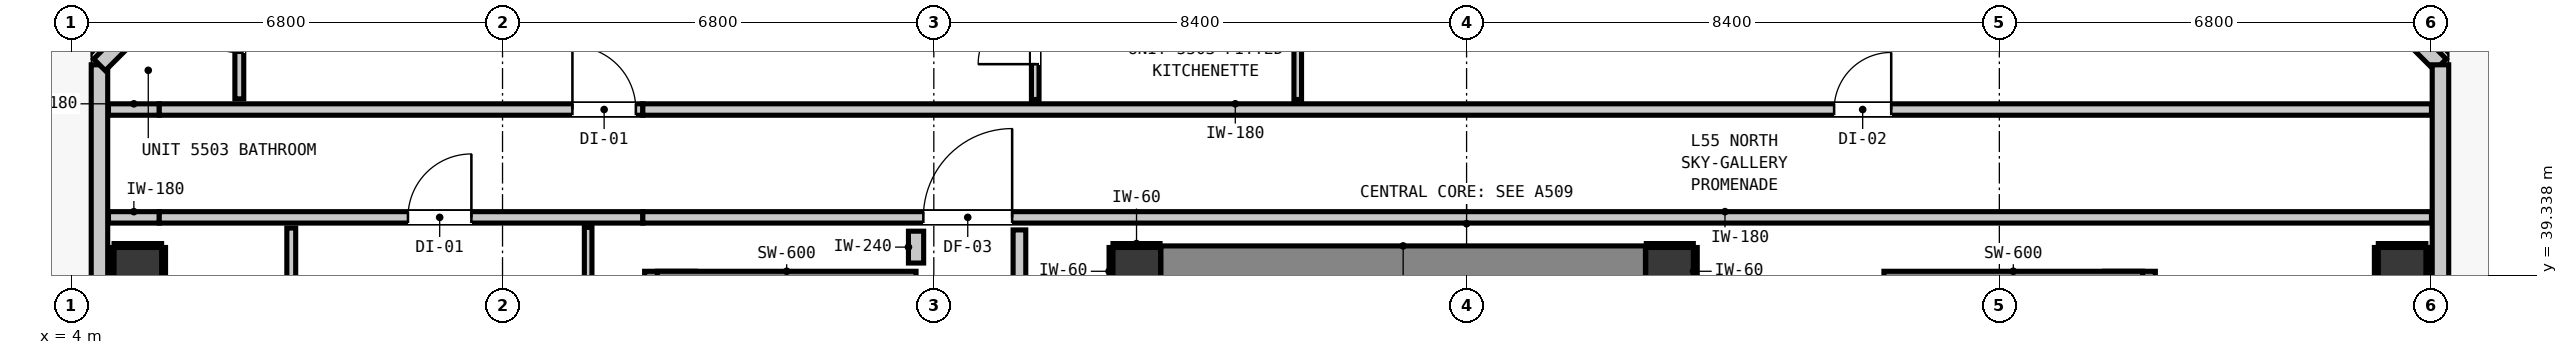
"""IFC4 building model, lengths in metres.
Left out: names, types, materials, properties, quantities, classifications, styles, units other than length and angle.
Written with IfcOpenShell. Run it as: python <this file> out.ifc"""

import sys

from ifc_helpers import new_model, si_unit, direction, frame, frame_2d, origin, origin_2d, place, context, subcontext, project, spatial, rectangle, extrude, element, fill, save


model = new_model("IFC4")
c1 = context("Model", 3, precision=1e-05, world=origin(), true_north=direction((0.0, 1.0)))
c2 = subcontext(c1, "Body", "Model", "MODEL_VIEW")
j1 = project(units=[si_unit("LENGTHUNIT", "METRE"), si_unit("PLANEANGLEUNIT", "RADIAN")], contexts=[c1])
p1 = place(None, origin())
s1 = spatial("IfcSite", under=j1, at=p1, CompositionType="ELEMENT")
p2 = place(p1, origin())
s2 = spatial("IfcBuilding", under=s1, at=p2, CompositionType="ELEMENT")
p3 = place(p2, frame((0.0, 0.0, 190.16)))
s3 = spatial("IfcBuildingStorey", under=s2, at=p3, CompositionType="ELEMENT", Elevation=190.16)
for number, where, z_axis, x_axis in (
    (1, (20.8, 39.4, 0.0), (0.0, 0.0, 1.0), (1.0, 0.0, 0.0)),
    (2, (29.2, 39.4, 0.0), (0.0, 0.0, 1.0), (1.0, 0.0, 0.0)),
):
    element("IfcColumn", number, at=place(p3, frame(where, z_axis=z_axis, x_axis=x_axis)), inside=s3, PredefinedType="COLUMN", context=c2, shape_type="SweptSolid", body=[
        extrude(rectangle(XDim=0.75, YDim=0.75, at=origin_2d()), origin(), (0.0, 0.0, 1.0), 3.32),
    ])
p4 = place(p3, frame((13.44, 31.08, 0.0), z_axis=(0.0, 0.0, 1.0), x_axis=(0.0, 1.0, 0.0)))
e3 = element("IfcWall", 3, at=p4, inside=s3, PredefinedType="SHEAR", context=c2, shape_type="SweptSolid", body=[
    extrude(rectangle(XDim=8.32, YDim=0.8, at=frame_2d((4.16, 0.0))), origin(), (0.0, 0.0, 1.0), 3.32),
])
p5 = place(p3, frame((13.24, 39.1, 0.0), z_axis=(0.0, 0.0, 1.0), x_axis=(1.0, 0.0, 0.0)))
e4 = element("IfcWall", 4, at=p5, inside=s3, PredefinedType="SHEAR", context=c2, shape_type="SweptSolid", body=[
    extrude(rectangle(XDim=4.08, YDim=0.6, at=frame_2d((2.04, 0.0))), origin(), (0.0, 0.0, 1.0), 3.32),
])
p6 = place(p3, frame((36.46, 31.08, 0.0), z_axis=(0.0, 0.0, 1.0), x_axis=(0.0, 1.0, 0.0)))
e5 = element("IfcWall", 5, at=p6, inside=s3, PredefinedType="SHEAR", context=c2, shape_type="SweptSolid", body=[
    extrude(rectangle(XDim=8.32, YDim=0.8, at=frame_2d((4.16, 0.0))), origin(), (0.0, 0.0, 1.0), 3.32),
])
p7 = place(p3, frame((32.58, 39.1, 0.0), z_axis=(0.0, 0.0, 1.0), x_axis=(1.0, 0.0, 0.0)))
e6 = element("IfcWall", 6, at=p7, inside=s3, PredefinedType="SHEAR", context=c2, shape_type="SweptSolid", body=[
    extrude(rectangle(XDim=4.08, YDim=0.6, at=frame_2d((2.04, 0.0))), origin(), (0.0, 0.0, 1.0), 3.32),
])
p8 = place(p3, frame((21.18, 39.4, 0.0), z_axis=(0.0, 0.0, 1.0), x_axis=(1.0, 0.0, 0.0)))
e7 = element("IfcWall", 7, at=p8, inside=s3, PredefinedType="SHEAR", context=c2, shape_type="SweptSolid", body=[
    extrude(rectangle(XDim=7.64, YDim=0.8, at=frame_2d((3.82, 0.0))), origin(), (0.0, 0.0, 1.0), 3.32),
])
for number, where, z_axis, x_axis in (
    (8, (5.05, 39.4, -0.2), (0.0, 0.0, 1.0), (1.0, 0.0, 0.0)),
    (9, (40.75, 39.4, -0.2), (0.0, 0.0, 1.0), (1.0, 0.0, 0.0)),
):
    element("IfcColumn", number, at=place(p3, frame(where, z_axis=z_axis, x_axis=x_axis)), inside=s3, PredefinedType="COLUMN", context=c2, shape_type="SweptSolid", body=[
        extrude(rectangle(XDim=0.75, YDim=0.75, at=origin_2d()), origin(), (0.0, 0.0, 1.0), 3.52),
    ])
p9 = place(p3, frame((4.445, 12.345, 0.0), z_axis=(0.0, 0.0, 1.0), x_axis=(0.0, 1.0, 0.0)))
e10 = element("IfcWall", 10, at=p9, inside=s3, PredefinedType="STANDARD", context=c2, shape_type="SweptSolid", body=[
    extrude(rectangle(XDim=30.31, YDim=0.26, at=frame_2d((15.155, 0.0))), origin(), (0.0, 0.0, 1.0), 3.1),
])
p10 = place(p9, frame((10.728, 0.0, 0.0)))
e11 = element("IfcOpeningElement", 11, at=p10, cuts=e10, PredefinedType="OPENING", context=c2, shape_type="SweptSolid", body=[
    extrude(rectangle(XDim=1.1, YDim=2.15, at=frame_2d((0.55, 1.075))), frame((0.0, 0.14, 0.0), z_axis=(0.0, -1.0, 0.0), x_axis=(1.0, 0.0, 0.0)), (0.0, 0.0, 1.0), 0.28),
])
p11 = place(p9, frame((0.252, 0.0, 0.85)))
e12 = element("IfcOpeningElement", 12, at=p11, cuts=e10, PredefinedType="OPENING", context=c2, shape_type="SweptSolid", body=[
    extrude(rectangle(XDim=2.7, YDim=2.0, at=frame_2d((1.35, 1.0))), frame((0.0, 0.14, 0.0), z_axis=(0.0, -1.0, 0.0), x_axis=(1.0, 0.0, 0.0)), (0.0, 0.0, 1.0), 0.28),
])
for number, where, z_axis, x_axis in (
    (13, (4.445, 42.655, 0.0), (0.0, 0.0, 1.0), (0.707, 0.707, 0.0)),
    (14, (39.255, 44.755, 0.0), (0.0, 0.0, 1.0), (0.707, -0.707, 0.0)),
):
    element("IfcWall", number, at=place(p3, frame(where, z_axis=z_axis, x_axis=x_axis)), inside=s3, PredefinedType="STANDARD", context=c2, shape_type="SweptSolid", body=[
        extrude(rectangle(XDim=2.97, YDim=0.26, at=frame_2d((1.485, 0.0))), origin(), (0.0, 0.0, 1.0), 3.1),
    ])
p12 = place(p3, frame((41.355, 42.655, 0.0), z_axis=(0.0, 0.0, 1.0), x_axis=(0.0, -1.0, 0.0)))
e15 = element("IfcWall", 15, at=p12, inside=s3, PredefinedType="STANDARD", context=c2, shape_type="SweptSolid", body=[
    extrude(rectangle(XDim=30.31, YDim=0.26, at=frame_2d((15.155, 0.0))), origin(), (0.0, 0.0, 1.0), 3.1),
])
p13 = place(p12, frame((23.768, 0.0, 0.0)))
e16 = element("IfcOpeningElement", 16, at=p13, cuts=e15, PredefinedType="OPENING", context=c2, shape_type="SweptSolid", body=[
    extrude(rectangle(XDim=1.1, YDim=2.15, at=frame_2d((0.55, 1.075))), frame((0.0, 0.14, 0.0), z_axis=(0.0, -1.0, 0.0), x_axis=(1.0, 0.0, 0.0)), (0.0, 0.0, 1.0), 0.28),
])
p14 = place(p12, frame((25.507, 0.0, 0.85)))
e17 = element("IfcOpeningElement", 17, at=p14, cuts=e15, PredefinedType="OPENING", context=c2, shape_type="SweptSolid", body=[
    extrude(rectangle(XDim=1.05, YDim=1.65, at=frame_2d((0.525, 0.825))), frame((0.0, 0.14, 0.0), z_axis=(0.0, -1.0, 0.0), x_axis=(1.0, 0.0, 0.0)), (0.0, 0.0, 1.0), 0.28),
])
p15 = place(p12, frame((27.358, 0.0, 0.85)))
e18 = element("IfcOpeningElement", 18, at=p15, cuts=e15, PredefinedType="OPENING", context=c2, shape_type="SweptSolid", body=[
    extrude(rectangle(XDim=2.7, YDim=2.0, at=frame_2d((1.35, 1.0))), frame((0.0, 0.14, 0.0), z_axis=(0.0, -1.0, 0.0), x_axis=(1.0, 0.0, 0.0)), (0.0, 0.0, 1.0), 0.28),
])
p16 = place(p3, frame((4.587, 40.25, 0.0), z_axis=(0.0, 0.0, 1.0), x_axis=(1.0, 0.0, 0.0)))
e19 = element("IfcWall", 19, at=p16, inside=s3, PredefinedType="PARTITIONING", context=c2, shape_type="SweptSolid", body=[
    extrude(rectangle(XDim=0.801, YDim=0.18, at=frame_2d((0.4, 0.0))), origin(), (0.0, 0.0, 1.0), 3.1),
])
p17 = place(p3, frame((5.388, 40.25, 0.0), z_axis=(0.0, 0.0, 1.0), x_axis=(1.0, 0.0, 0.0)))
e20 = element("IfcWall", 20, at=p17, inside=s3, PredefinedType="PARTITIONING", context=c2, shape_type="SweptSolid", body=[
    extrude(rectangle(XDim=7.624, YDim=0.18, at=frame_2d((3.812, 0.0))), origin(), (0.0, 0.0, 1.0), 2.477),
])
p18 = place(p17, frame((3.921, 0.0, 0.0)))
e21 = element("IfcOpeningElement", 21, at=p18, cuts=e20, PredefinedType="OPENING", context=c2, shape_type="SweptSolid", body=[
    extrude(rectangle(XDim=1.0, YDim=2.15, at=frame_2d((0.5, 1.075))), frame((0.0, 0.1, 0.0), z_axis=(0.0, -1.0, 0.0), x_axis=(1.0, 0.0, 0.0)), (0.0, 0.0, 1.0), 0.2),
])
p19 = place(p3, frame((13.012, 40.25, 0.0), z_axis=(0.0, 0.0, 1.0), x_axis=(1.0, 0.0, 0.0)))
e22 = element("IfcWall", 22, at=p19, inside=s3, PredefinedType="PARTITIONING", context=c2, shape_type="SweptSolid", body=[
    extrude(rectangle(XDim=28.201, YDim=0.18, at=frame_2d((14.101, 0.0))), origin(), (0.0, 0.0, 1.0), 3.1),
])
p20 = place(p19, frame((4.423, 0.0, 0.0)))
e23 = element("IfcOpeningElement", 23, at=p20, cuts=e22, PredefinedType="OPENING", context=c2, shape_type="SweptSolid", body=[
    extrude(rectangle(XDim=1.4, YDim=2.15, at=frame_2d((0.7, 1.075))), frame((0.0, 0.1, 0.0), z_axis=(0.0, -1.0, 0.0), x_axis=(1.0, 0.0, 0.0)), (0.0, 0.0, 1.0), 0.2),
])
p21 = place(p3, frame((4.587, 41.95, 0.0), z_axis=(0.0, 0.0, 1.0), x_axis=(1.0, 0.0, 0.0)))
e24 = element("IfcWall", 24, at=p21, inside=s3, PredefinedType="PARTITIONING", context=c2, shape_type="SweptSolid", body=[
    extrude(rectangle(XDim=0.801, YDim=0.18, at=frame_2d((0.4, 0.0))), origin(), (0.0, 0.0, 1.0), 3.1),
])
p22 = place(p3, frame((5.388, 41.95, 0.0), z_axis=(0.0, 0.0, 1.0), x_axis=(1.0, 0.0, 0.0)))
e25 = element("IfcWall", 25, at=p22, inside=s3, PredefinedType="PARTITIONING", context=c2, shape_type="SweptSolid", body=[
    extrude(rectangle(XDim=7.624, YDim=0.18, at=frame_2d((3.812, 0.0))), origin(), (0.0, 0.0, 1.0), 2.477),
])
p23 = place(p22, frame((6.514, 0.0, 0.0)))
e26 = element("IfcOpeningElement", 26, at=p23, cuts=e25, PredefinedType="OPENING", context=c2, shape_type="SweptSolid", body=[
    extrude(rectangle(XDim=1.0, YDim=2.15, at=frame_2d((0.5, 1.075))), frame((0.0, 0.1, 0.0), z_axis=(0.0, -1.0, 0.0), x_axis=(1.0, 0.0, 0.0)), (0.0, 0.0, 1.0), 0.2),
])
p24 = place(p3, frame((13.012, 41.95, 0.0), z_axis=(0.0, 0.0, 1.0), x_axis=(1.0, 0.0, 0.0)))
e27 = element("IfcWall", 27, at=p24, inside=s3, PredefinedType="PARTITIONING", context=c2, shape_type="SweptSolid", body=[
    extrude(rectangle(XDim=28.201, YDim=0.18, at=frame_2d((14.101, 0.0))), origin(), (0.0, 0.0, 1.0), 3.1),
])
p25 = place(p24, frame((18.783, 0.0, 0.0)))
e28 = element("IfcOpeningElement", 28, at=p25, cuts=e27, PredefinedType="OPENING", context=c2, shape_type="SweptSolid", body=[
    extrude(rectangle(XDim=0.9, YDim=2.1, at=frame_2d((0.45, 1.05))), frame((0.0, 0.1, 0.0), z_axis=(0.0, -1.0, 0.0), x_axis=(1.0, 0.0, 0.0)), (0.0, 0.0, 1.0), 0.2),
])
p26 = place(p3, frame((17.32, 39.53, 0.0), z_axis=(0.0, 0.0, 1.0), x_axis=(0.0, 1.0, 0.0)))
e29 = element("IfcWall", 29, at=p26, inside=s3, PredefinedType="PARTITIONING", context=c2, shape_type="SweptSolid", body=[
    extrude(rectangle(XDim=0.502, YDim=0.24, at=frame_2d((0.251, 0.0))), origin(), (0.0, 0.0, 1.0), 3.1),
])
p27 = place(p3, frame((18.95, 38.918, 0.0), z_axis=(0.0, 0.0, 1.0), x_axis=(0.0, 1.0, 0.0)))
e30 = element("IfcWall", 30, at=p27, inside=s3, PredefinedType="PARTITIONING", context=c2, shape_type="SweptSolid", body=[
    extrude(rectangle(XDim=1.134, YDim=0.2, at=frame_2d((0.567, 0.0))), origin(), (0.0, 0.0, 1.0), 3.1),
])
p28 = place(p3, frame((6.65, 42.118, 0.0), z_axis=(0.0, 0.0, 1.0), x_axis=(0.0, 1.0, 0.0)))
e31 = element("IfcWall", 31, at=p28, inside=s3, PredefinedType="PARTITIONING", context=c2, shape_type="SweptSolid", body=[
    extrude(rectangle(XDim=2.495, YDim=0.14, at=frame_2d((1.248, 0.0))), origin(), (0.0, 0.0, 1.0), 3.1),
])
p29 = place(p28, frame((0.727, 0.0, 0.0)))
e32 = element("IfcOpeningElement", 32, at=p29, cuts=e31, PredefinedType="OPENING", context=c2, shape_type="SweptSolid", body=[
    extrude(rectangle(XDim=0.86, YDim=2.02, at=frame_2d((0.43, 1.01))), frame((0.0, 0.08, 0.0), z_axis=(0.0, -1.0, 0.0), x_axis=(1.0, 0.0, 0.0)), (0.0, 0.0, 1.0), 0.16),
])
p30 = place(p3, frame((7.469, 36.635, 0.0), z_axis=(0.0, 0.0, 1.0), x_axis=(0.0, 1.0, 0.0)))
e33 = element("IfcWall", 33, at=p30, inside=s3, PredefinedType="PARTITIONING", context=c2, shape_type="SweptSolid", body=[
    extrude(rectangle(XDim=3.447, YDim=0.14, at=frame_2d((1.724, 0.0))), origin(), (0.0, 0.0, 1.0), 3.1),
])
p31 = place(p30, frame((1.271, 0.0, 0.0)))
e34 = element("IfcOpeningElement", 34, at=p31, cuts=e33, PredefinedType="OPENING", context=c2, shape_type="SweptSolid", body=[
    extrude(rectangle(XDim=0.9, YDim=2.1, at=frame_2d((0.45, 1.05))), frame((0.0, 0.08, 0.0), z_axis=(0.0, -1.0, 0.0), x_axis=(1.0, 0.0, 0.0)), (0.0, 0.0, 1.0), 0.16),
])
p32 = place(p3, frame((12.15, 31.808, 0.0), z_axis=(0.0, 0.0, 1.0), x_axis=(0.0, 1.0, 0.0)))
e35 = element("IfcWall", 35, at=p32, inside=s3, PredefinedType="PARTITIONING", context=c2, shape_type="SweptSolid", body=[
    extrude(rectangle(XDim=8.284, YDim=0.12, at=frame_2d((4.142, 0.0))), origin(), (0.0, 0.0, 1.0), 3.1),
])
p33 = place(p3, frame((19.199, 42.108, 0.0), z_axis=(0.0, 0.0, 1.0), x_axis=(0.0, 1.0, 0.0)))
e36 = element("IfcWall", 36, at=p33, inside=s3, PredefinedType="PARTITIONING", context=c2, shape_type="SweptSolid", body=[
    extrude(rectangle(XDim=2.505, YDim=0.12, at=frame_2d((1.252, 0.0))), origin(), (0.0, 0.0, 1.0), 3.1),
])
p34 = place(p33, frame((0.557, 0.0, 0.0)))
e37 = element("IfcOpeningElement", 37, at=p34, cuts=e36, PredefinedType="OPENING", context=c2, shape_type="SweptSolid", body=[
    extrude(rectangle(XDim=0.9, YDim=2.1, at=frame_2d((0.45, 1.05))), frame((0.0, 0.07, 0.0), z_axis=(0.0, -1.0, 0.0), x_axis=(1.0, 0.0, 0.0)), (0.0, 0.0, 1.0), 0.14),
])
p35 = place(p3, frame((23.338, 42.108, 0.0), z_axis=(0.0, 0.0, 1.0), x_axis=(0.0, 1.0, 0.0)))
e38 = element("IfcWall", 38, at=p35, inside=s3, PredefinedType="PARTITIONING", context=c2, shape_type="SweptSolid", body=[
    extrude(rectangle(XDim=2.505, YDim=0.12, at=frame_2d((1.252, 0.0))), origin(), (0.0, 0.0, 1.0), 3.1),
])
p36 = place(p3, frame((20.425, 39.807, 0.0), z_axis=(0.0, 0.0, 1.0), x_axis=(1.0, 0.0, 0.0)))
e39 = element("IfcWall", 39, at=p36, inside=s3, PredefinedType="PARTITIONING", context=c2, shape_type="SweptSolid", body=[
    extrude(rectangle(XDim=0.742, YDim=0.06, at=frame_2d((0.371, 0.0))), origin(), (0.0, 0.0, 1.0), 1.45),
])
p37 = place(p3, frame((20.393, 39.025, 0.0), z_axis=(0.0, 0.0, 1.0), x_axis=(0.0, 1.0, 0.0)))
e40 = element("IfcWall", 40, at=p37, inside=s3, PredefinedType="PARTITIONING", context=c2, shape_type="SweptSolid", body=[
    extrude(rectangle(XDim=0.75, YDim=0.06, at=frame_2d((0.375, 0.0))), origin(), (0.0, 0.0, 1.0), 1.45),
])
p38 = place(p3, frame((28.833, 39.807, 0.0), z_axis=(0.0, 0.0, 1.0), x_axis=(1.0, 0.0, 0.0)))
e41 = element("IfcWall", 41, at=p38, inside=s3, PredefinedType="PARTITIONING", context=c2, shape_type="SweptSolid", body=[
    extrude(rectangle(XDim=0.742, YDim=0.06, at=frame_2d((0.371, 0.0))), origin(), (0.0, 0.0, 1.0), 1.45),
])
for number, where, z_axis, x_axis in (
    (42, (29.607, 39.025, 0.0), (0.0, 0.0, 1.0), (0.0, 1.0, 0.0)),
    (43, (4.675, 39.807, 0.0), (0.0, 0.0, 1.0), (1.0, 0.0, 0.0)),
    (44, (4.643, 39.025, 0.0), (0.0, 0.0, 1.0), (0.0, 1.0, 0.0)),
    (45, (5.457, 39.025, 0.0), (0.0, 0.0, 1.0), (0.0, 1.0, 0.0)),
    (46, (40.375, 39.807, 0.0), (0.0, 0.0, 1.0), (1.0, 0.0, 0.0)),
    (47, (40.343, 39.025, 0.0), (0.0, 0.0, 1.0), (0.0, 1.0, 0.0)),
    (48, (41.157, 39.025, 0.0), (0.0, 0.0, 1.0), (0.0, 1.0, 0.0)),
):
    element("IfcWall", number, at=place(p3, frame(where, z_axis=z_axis, x_axis=x_axis)), inside=s3, PredefinedType="PARTITIONING", context=c2, shape_type="SweptSolid", body=[
        extrude(rectangle(XDim=0.75, YDim=0.06, at=frame_2d((0.375, 0.0))), origin(), (0.0, 0.0, 1.0), 1.45),
    ])
p39 = place(p20, origin())
e49 = element("IfcDoor", 49, at=p39, inside=s3, OperationType="SINGLE_SWING_RIGHT", PredefinedType="DOOR", context=c2, shape_type="SweptSolid", body=[
    extrude(rectangle(XDim=1.4, YDim=2.15, at=frame_2d((0.7, 1.075))), frame((0.0, 0.025, 0.0), z_axis=(0.0, -1.0, 0.0), x_axis=(1.0, 0.0, 0.0)), (0.0, 0.0, 1.0), 0.05),
])
fill(e23, e49)
p40 = place(p23, origin())
e50 = element("IfcDoor", 50, at=p40, inside=s3, OperationType="SINGLE_SWING_LEFT", PredefinedType="DOOR", context=c2, shape_type="SweptSolid", body=[
    extrude(rectangle(XDim=1.0, YDim=2.15, at=frame_2d((0.5, 1.075))), frame((0.0, 0.025, 0.0), z_axis=(0.0, -1.0, 0.0), x_axis=(1.0, 0.0, 0.0)), (0.0, 0.0, 1.0), 0.05),
])
fill(e26, e50)
p41 = place(p29, origin())
e51 = element("IfcDoor", 51, at=p41, inside=s3, OperationType="SINGLE_SWING_RIGHT", PredefinedType="DOOR", context=c2, shape_type="SweptSolid", body=[
    extrude(rectangle(XDim=0.86, YDim=2.02, at=frame_2d((0.43, 1.01))), frame((0.0, 0.025, 0.0), z_axis=(0.0, -1.0, 0.0), x_axis=(1.0, 0.0, 0.0)), (0.0, 0.0, 1.0), 0.05),
])
fill(e32, e51)
p42 = place(p34, origin())
e52 = element("IfcDoor", 52, at=p42, inside=s3, OperationType="SINGLE_SWING_LEFT", PredefinedType="DOOR", context=c2, shape_type="SweptSolid", body=[
    extrude(rectangle(XDim=0.9, YDim=2.1, at=frame_2d((0.45, 1.05))), frame((0.0, 0.025, 0.0), z_axis=(0.0, -1.0, 0.0), x_axis=(1.0, 0.0, 0.0)), (0.0, 0.0, 1.0), 0.05),
])
fill(e37, e52)
p43 = place(p25, origin())
e53 = element("IfcDoor", 53, at=p43, inside=s3, OperationType="SINGLE_SWING_RIGHT", PredefinedType="DOOR", context=c2, shape_type="SweptSolid", body=[
    extrude(rectangle(XDim=0.9, YDim=2.1, at=frame_2d((0.45, 1.05))), frame((0.0, 0.025, 0.0), z_axis=(0.0, -1.0, 0.0), x_axis=(1.0, 0.0, 0.0)), (0.0, 0.0, 1.0), 0.05),
])
fill(e28, e53)
p44 = place(p18, origin())
e54 = element("IfcDoor", 54, at=p44, inside=s3, OperationType="SINGLE_SWING_RIGHT", PredefinedType="DOOR", context=c2, shape_type="SweptSolid", body=[
    extrude(rectangle(XDim=1.0, YDim=2.15, at=frame_2d((0.5, 1.075))), frame((0.0, 0.025, 0.0), z_axis=(0.0, -1.0, 0.0), x_axis=(1.0, 0.0, 0.0)), (0.0, 0.0, 1.0), 0.05),
])
fill(e21, e54)
save(model, sys.argv[1])
